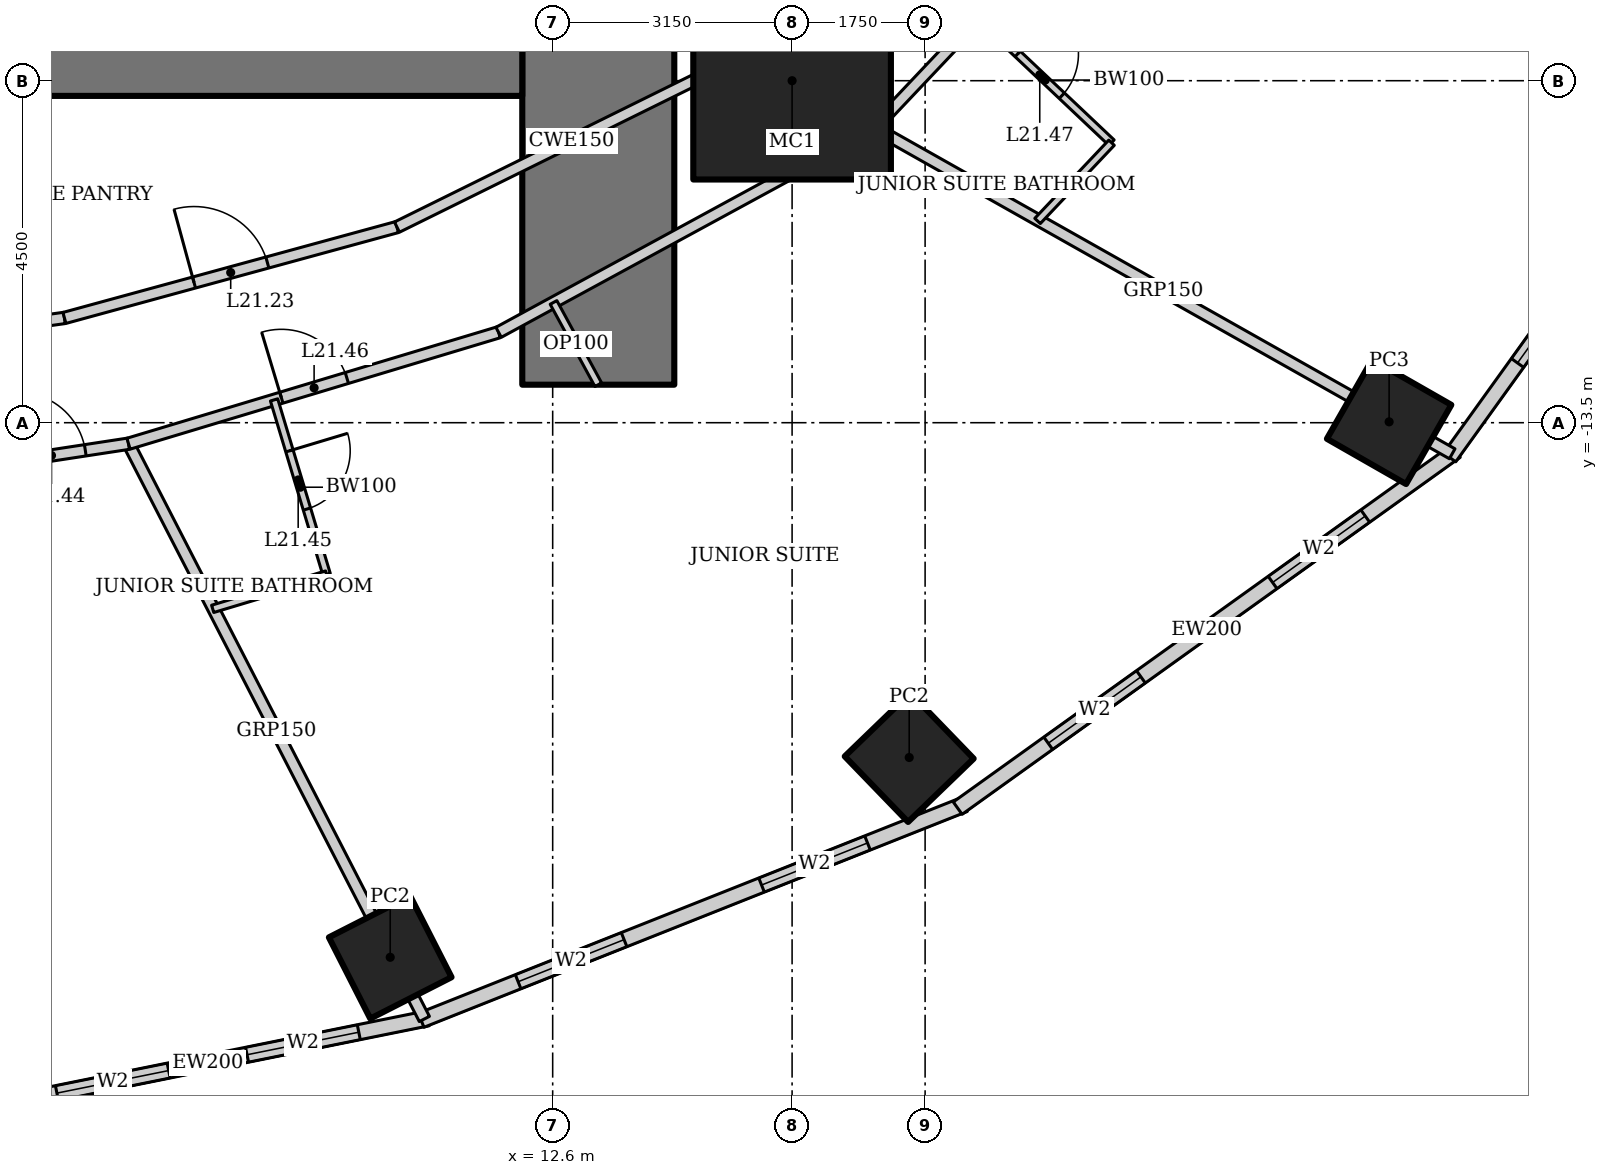
"""IFC4 building model, lengths in metres.
Left out: names, types, materials, properties, quantities, classifications, styles, units other than length and angle.
Written with IfcOpenShell. Run it as: python <this file> out.ifc"""

import sys

from ifc_helpers import new_model, si_unit, direction, frame, frame_2d, origin, origin_2d, place, context, subcontext, project, spatial, rectangle, hollow_rectangle, extrude, element, fill, save


model = new_model("IFC4")
c1 = context("Model", 3, precision=1e-05, world=origin(), true_north=direction((0.0, 1.0)))
c2 = subcontext(c1, "Body", "Model", "MODEL_VIEW")
j1 = project(units=[si_unit("LENGTHUNIT", "METRE"), si_unit("PLANEANGLEUNIT", "RADIAN")], contexts=[c1])
p1 = place(None, origin())
s1 = spatial("IfcSite", under=j1, at=p1, CompositionType="ELEMENT")
p2 = place(p1, origin())
s2 = spatial("IfcBuilding", under=s1, at=p2, CompositionType="ELEMENT")
p3 = place(p2, frame((0.0, 0.0, 91.0)))
s3 = spatial("IfcBuildingStorey", under=s2, at=p3, CompositionType="ELEMENT", Elevation=91.0)
p4 = place(p3, frame((15.75, -9.0, 0.0), z_axis=(0.0, 0.0, 1.0), x_axis=(1.0, 0.0, 0.0)))
e1 = element("IfcColumn", 1, at=p4, inside=s3, PredefinedType="COLUMN", context=c2, shape_type="SweptSolid", body=[
    extrude(hollow_rectangle(XDim=2.6, YDim=2.6, WallThickness=0.13, at=origin_2d()), origin(), (0.0, 0.0, 1.0), 3.6),
])
for number, where, z_axis, x_axis in (
    (2, (10.463, -20.534, 0.0), (0.0, 0.0, 1.0), (0.891, 0.454, 0.0)),
    (3, (17.291, -17.905, 0.0), (0.0, 0.0, 1.0), (0.719, 0.695, 0.0)),
):
    element("IfcColumn", number, at=place(p3, frame(where, z_axis=z_axis, x_axis=x_axis)), inside=s3, PredefinedType="COLUMN", context=c2, shape_type="SweptSolid", body=[
        extrude(hollow_rectangle(XDim=1.2, YDim=1.2, WallThickness=0.1, at=origin_2d()), origin(), (0.0, 0.0, 1.0), 3.6),
    ])
p5 = place(p3, frame((23.605, -13.489, 0.0), z_axis=(0.0, 0.0, 1.0), x_axis=(0.496139221777, 0.86824298017, 0.0)))
e4 = element("IfcColumn", 4, at=p5, inside=s3, PredefinedType="COLUMN", context=c2, shape_type="SweptSolid", body=[
    extrude(hollow_rectangle(XDim=1.2, YDim=1.2, WallThickness=0.12, at=origin_2d()), origin(), (0.0, 0.0, 1.0), 3.6),
])
p6 = place(p3, frame((13.2, -13.0, 0.0), z_axis=(0.0, 0.0, 1.0), x_axis=(0.0, 1.0, 0.0)))
e5 = element("IfcWall", 5, at=p6, inside=s3, PredefinedType="SHEAR", context=c2, shape_type="SweptSolid", body=[
    extrude(rectangle(XDim=26.0, YDim=2.0, at=frame_2d((13.0, 0.0))), origin(), (0.0, 0.0, 1.0), 3.6),
])
p7 = place(p6, frame((12.1, 0.0, 0.0)))
e6 = element("IfcOpeningElement", 6, at=p7, cuts=e5, PredefinedType="OPENING", context=c2, shape_type="SweptSolid", body=[
    extrude(rectangle(XDim=1.8, YDim=2.1, at=frame_2d((0.9, 1.05))), frame((0.0, 1.01, 0.0), z_axis=(0.0, -1.0, 0.0), x_axis=(1.0, 0.0, 0.0)), (0.0, 0.0, 1.0), 2.02),
])
p8 = place(p3, frame((-12.2, -8.0, 0.0), z_axis=(0.0, 0.0, 1.0), x_axis=(1.0, 0.0, 0.0)))
e7 = element("IfcWall", 7, at=p8, inside=s3, PredefinedType="SHEAR", context=c2, shape_type="SweptSolid", body=[
    extrude(rectangle(XDim=24.4, YDim=2.4, at=frame_2d((12.2, 0.0))), origin(), (0.0, 0.0, 1.0), 3.6),
])
p9 = place(p3, frame((5.17, -22.504, 0.0), z_axis=(0.0, 0.0, 1.0), x_axis=(0.980251657452, 0.197754110105, 0.0)))
e8 = element("IfcWall", 8, at=p9, inside=s3, PredefinedType="SOLIDWALL", context=c2, shape_type="SweptSolid", body=[
    extrude(rectangle(XDim=5.904, YDim=0.2, at=frame_2d((2.952, 0.0))), origin(), (0.0, 0.0, 1.0), 3.45),
])
p10 = place(p9, frame((0.926, 0.0, 0.5)))
e9 = element("IfcOpeningElement", 9, at=p10, cuts=e8, PredefinedType="OPENING", context=c2, shape_type="SweptSolid", body=[
    extrude(rectangle(XDim=1.5, YDim=2.2, at=frame_2d((0.75, 1.1))), frame((0.0, 0.11, 0.0), z_axis=(0.0, -1.0, 0.0), x_axis=(1.0, 0.0, 0.0)), (0.0, 0.0, 1.0), 0.22),
])
p11 = place(p9, frame((3.478, 0.0, 0.5)))
e10 = element("IfcOpeningElement", 10, at=p11, cuts=e8, PredefinedType="OPENING", context=c2, shape_type="SweptSolid", body=[
    extrude(rectangle(XDim=1.5, YDim=2.2, at=frame_2d((0.75, 1.1))), frame((0.0, 0.11, 0.0), z_axis=(0.0, -1.0, 0.0), x_axis=(1.0, 0.0, 0.0)), (0.0, 0.0, 1.0), 0.22),
])
p12 = place(p3, frame((10.869, -21.363, 0.0), z_axis=(0.0, 0.0, 1.0), x_axis=(0.929358351251, 0.369178892895, 0.0)))
e11 = element("IfcWall", 11, at=p12, inside=s3, PredefinedType="SOLIDWALL", context=c2, shape_type="SweptSolid", body=[
    extrude(rectangle(XDim=7.692, YDim=0.2, at=frame_2d((3.846, 0.0))), origin(), (0.0, 0.0, 1.0), 3.45),
])
p13 = place(p12, frame((1.373, 0.0, 0.5)))
e12 = element("IfcOpeningElement", 12, at=p13, cuts=e11, PredefinedType="OPENING", context=c2, shape_type="SweptSolid", body=[
    extrude(rectangle(XDim=1.5, YDim=2.2, at=frame_2d((0.75, 1.1))), frame((0.0, 0.11, 0.0), z_axis=(0.0, -1.0, 0.0), x_axis=(1.0, 0.0, 0.0)), (0.0, 0.0, 1.0), 0.22),
])
p14 = place(p12, frame((4.819, 0.0, 0.5)))
e13 = element("IfcOpeningElement", 13, at=p14, cuts=e11, PredefinedType="OPENING", context=c2, shape_type="SweptSolid", body=[
    extrude(rectangle(XDim=1.5, YDim=2.2, at=frame_2d((0.75, 1.1))), frame((0.0, 0.11, 0.0), z_axis=(0.0, -1.0, 0.0), x_axis=(1.0, 0.0, 0.0)), (0.0, 0.0, 1.0), 0.22),
])
p15 = place(p3, frame((17.929, -18.572, 0.0), z_axis=(0.0, 0.0, 1.0), x_axis=(0.812791321576, 0.582554948112, 0.0)))
e14 = element("IfcWall", 14, at=p15, inside=s3, PredefinedType="SOLIDWALL", context=c2, shape_type="SweptSolid", body=[
    extrude(rectangle(XDim=8.063, YDim=0.2, at=frame_2d((4.032, 0.0))), origin(), (0.0, 0.0, 1.0), 3.45),
])
p16 = place(p15, frame((1.466, 0.0, 0.5)))
e15 = element("IfcOpeningElement", 15, at=p16, cuts=e14, PredefinedType="OPENING", context=c2, shape_type="SweptSolid", body=[
    extrude(rectangle(XDim=1.5, YDim=2.2, at=frame_2d((0.75, 1.1))), frame((0.0, 0.11, 0.0), z_axis=(0.0, -1.0, 0.0), x_axis=(1.0, 0.0, 0.0)), (0.0, 0.0, 1.0), 0.22),
])
p17 = place(p15, frame((5.097, 0.0, 0.5)))
e16 = element("IfcOpeningElement", 16, at=p17, cuts=e14, PredefinedType="OPENING", context=c2, shape_type="SweptSolid", body=[
    extrude(rectangle(XDim=1.5, YDim=2.2, at=frame_2d((0.75, 1.1))), frame((0.0, 0.11, 0.0), z_axis=(0.0, -1.0, 0.0), x_axis=(1.0, 0.0, 0.0)), (0.0, 0.0, 1.0), 0.22),
])
p18 = place(p3, frame((24.4, -13.957, 0.0), z_axis=(0.0, 0.0, 1.0), x_axis=(0.583937613703, 0.811798536155, 0.0)))
e17 = element("IfcWall", 17, at=p18, inside=s3, PredefinedType="SOLIDWALL", context=c2, shape_type="SweptSolid", body=[
    extrude(rectangle(XDim=8.323, YDim=0.2, at=frame_2d((4.162, 0.0))), origin(), (0.0, 0.0, 1.0), 3.45),
])
p19 = place(p18, frame((1.531, 0.0, 0.5)))
e18 = element("IfcOpeningElement", 18, at=p19, cuts=e17, PredefinedType="OPENING", context=c2, shape_type="SweptSolid", body=[
    extrude(rectangle(XDim=1.5, YDim=2.2, at=frame_2d((0.75, 1.1))), frame((0.0, 0.11, 0.0), z_axis=(0.0, -1.0, 0.0), x_axis=(1.0, 0.0, 0.0)), (0.0, 0.0, 1.0), 0.22),
])
p20 = place(p18, frame((5.292, 0.0, 0.5)))
e19 = element("IfcOpeningElement", 19, at=p20, cuts=e17, PredefinedType="OPENING", context=c2, shape_type="SweptSolid", body=[
    extrude(rectangle(XDim=1.5, YDim=2.2, at=frame_2d((0.75, 1.1))), frame((0.0, 0.11, 0.0), z_axis=(0.0, -1.0, 0.0), x_axis=(1.0, 0.0, 0.0)), (0.0, 0.0, 1.0), 0.22),
])
p21 = place(p3, frame((10.912, -21.346, 0.0), z_axis=(0.0, 0.0, 1.0), x_axis=(-0.457327273085, 0.889298468059, 0.0)))
e20 = element("IfcWall", 20, at=p21, inside=s3, PredefinedType="PARTITIONING", context=c2, shape_type="SweptSolid", body=[
    extrude(rectangle(XDim=8.511, YDim=0.15, at=frame_2d((4.256, 0.0))), origin(), (0.0, 0.0, 1.0), 2.528),
])
p22 = place(p3, frame((24.435, -13.909, 0.0), z_axis=(0.0, 0.0, 1.0), x_axis=(-0.87090601027, 0.491449612143, 0.0)))
e21 = element("IfcWall", 21, at=p22, inside=s3, PredefinedType="PARTITIONING", context=c2, shape_type="SweptSolid", body=[
    extrude(rectangle(XDim=8.726, YDim=0.15, at=frame_2d((4.363, 0.0))), origin(), (0.0, 0.0, 1.0), 2.693),
])
p23 = place(p3, frame((3.311, -14.342, 0.0), z_axis=(0.0, 0.0, 1.0), x_axis=(0.988564270062, 0.150800145746, 0.0)))
e22 = element("IfcWall", 22, at=p23, inside=s3, PredefinedType="PARTITIONING", context=c2, shape_type="SweptSolid", body=[
    extrude(rectangle(XDim=3.751, YDim=0.15, at=frame_2d((1.875, 0.0))), origin(), (0.0, 0.0, 1.0), 3.45),
])
p24 = place(p23, frame((2.276, 0.0, 0.0)))
e23 = element("IfcOpeningElement", 23, at=p24, cuts=e22, PredefinedType="OPENING", context=c2, shape_type="SweptSolid", body=[
    extrude(rectangle(XDim=0.9, YDim=2.1, at=frame_2d((0.45, 1.05))), frame((0.0, 0.085, 0.0), z_axis=(0.0, -1.0, 0.0), x_axis=(1.0, 0.0, 0.0)), (0.0, 0.0, 1.0), 0.17),
])
p25 = place(p3, frame((7.019, -13.776, 0.0), z_axis=(0.0, 0.0, 1.0), x_axis=(0.957564241242, 0.288219922793, 0.0)))
e24 = element("IfcWall", 24, at=p25, inside=s3, PredefinedType="PARTITIONING", context=c2, shape_type="SweptSolid", body=[
    extrude(rectangle(XDim=5.085, YDim=0.15, at=frame_2d((2.542, 0.0))), origin(), (0.0, 0.0, 1.0), 3.45),
])
p26 = place(p25, frame((2.1, 0.0, 0.0)))
e25 = element("IfcOpeningElement", 25, at=p26, cuts=e24, PredefinedType="OPENING", context=c2, shape_type="SweptSolid", body=[
    extrude(rectangle(XDim=0.9, YDim=2.1, at=frame_2d((0.45, 1.05))), frame((0.0, 0.085, 0.0), z_axis=(0.0, -1.0, 0.0), x_axis=(1.0, 0.0, 0.0)), (0.0, 0.0, 1.0), 0.17),
])
p27 = place(p3, frame((11.888, -12.311, 0.0), z_axis=(0.0, 0.0, 1.0), x_axis=(0.878450059298, 0.477834169267, 0.0)))
e26 = element("IfcWall", 26, at=p27, inside=s3, PredefinedType="PARTITIONING", context=c2, shape_type="SweptSolid", body=[
    extrude(rectangle(XDim=5.631, YDim=0.15, at=frame_2d((2.815, 0.0))), origin(), (0.0, 0.0, 1.0), 3.45),
])
p28 = place(p3, frame((16.835, -9.62, 0.0), z_axis=(0.0, 0.0, 1.0), x_axis=(0.687062608696, 0.726598218916, 0.0)))
e27 = element("IfcWall", 27, at=p28, inside=s3, PredefinedType="PARTITIONING", context=c2, shape_type="SweptSolid", body=[
    extrude(rectangle(XDim=6.039, YDim=0.15, at=frame_2d((3.02, 0.0))), origin(), (0.0, 0.0, 1.0), 3.45),
])
p29 = place(p3, frame((2.903, -12.574, 0.0), z_axis=(0.0, 0.0, 1.0), x_axis=(0.990563451353, 0.137054911782, 0.0)))
e28 = element("IfcWall", 28, at=p29, inside=s3, PredefinedType="PARTITIONING", context=c2, shape_type="SweptSolid", body=[
    extrude(rectangle(XDim=3.304, YDim=0.15, at=frame_2d((1.652, 0.0))), origin(), (0.0, 0.0, 1.0), 3.45),
])
p30 = place(p3, frame((6.176, -12.122, 0.0), z_axis=(0.0, 0.0, 1.0), x_axis=(0.964644466646, 0.263554648923, 0.0)))
e29 = element("IfcWall", 29, at=p30, inside=s3, PredefinedType="PARTITIONING", context=c2, shape_type="SweptSolid", body=[
    extrude(rectangle(XDim=4.535, YDim=0.15, at=frame_2d((2.268, 0.0))), origin(), (0.0, 0.0, 1.0), 3.45),
])
p31 = place(p30, frame((1.768, 0.0, 0.0)))
e30 = element("IfcOpeningElement", 30, at=p31, cuts=e29, PredefinedType="OPENING", context=c2, shape_type="SweptSolid", body=[
    extrude(rectangle(XDim=1.0, YDim=2.1, at=frame_2d((0.5, 1.05))), frame((0.0, 0.085, 0.0), z_axis=(0.0, -1.0, 0.0), x_axis=(1.0, 0.0, 0.0)), (0.0, 0.0, 1.0), 0.17),
])
p32 = place(p3, frame((10.551, -10.926, 0.0), z_axis=(0.0, 0.0, 1.0), x_axis=(0.89656943448, 0.442903205177, 0.0)))
e31 = element("IfcWall", 31, at=p32, inside=s3, PredefinedType="PARTITIONING", context=c2, shape_type="SweptSolid", body=[
    extrude(rectangle(XDim=5.126, YDim=0.15, at=frame_2d((2.563, 0.0))), origin(), (0.0, 0.0, 1.0), 3.45),
])
p33 = place(p3, frame((15.147, -8.656, 0.0), z_axis=(0.0, 0.0, 1.0), x_axis=(0.720837261072, 0.693104352209, 0.0)))
e32 = element("IfcWall", 32, at=p33, inside=s3, PredefinedType="PARTITIONING", context=c2, shape_type="SweptSolid", body=[
    extrude(rectangle(XDim=5.59, YDim=0.15, at=frame_2d((2.795, 0.0))), origin(), (0.0, 0.0, 1.0), 3.45),
])
p34 = place(p33, frame((2.295, 0.0, 0.0)))
e33 = element("IfcOpeningElement", 33, at=p34, cuts=e32, PredefinedType="OPENING", context=c2, shape_type="SweptSolid", body=[
    extrude(rectangle(XDim=1.0, YDim=2.1, at=frame_2d((0.5, 1.05))), frame((0.0, 0.085, 0.0), z_axis=(0.0, -1.0, 0.0), x_axis=(1.0, 0.0, 0.0)), (0.0, 0.0, 1.0), 0.17),
])
p35 = place(p3, frame((8.935, -13.2, 0.0), z_axis=(0.0, 0.0, 1.0), x_axis=(0.288197066254, -0.957571120598, 0.0)))
e34 = element("IfcWall", 34, at=p35, inside=s3, PredefinedType="PARTITIONING", context=c2, shape_type="SweptSolid", body=[
    extrude(rectangle(XDim=2.4, YDim=0.1, at=frame_2d((1.2, 0.0))), origin(), (0.0, 0.0, 1.0), 3.45),
])
p36 = place(p35, frame((0.7, 0.0, 0.0)))
e35 = element("IfcOpeningElement", 35, at=p36, cuts=e34, PredefinedType="OPENING", context=c2, shape_type="SweptSolid", body=[
    extrude(rectangle(XDim=0.8, YDim=2.1, at=frame_2d((0.4, 1.05))), frame((0.0, 0.06, 0.0), z_axis=(0.0, -1.0, 0.0), x_axis=(1.0, 0.0, 0.0)), (0.0, 0.0, 1.0), 0.12),
])
p37 = place(p3, frame((9.626, -15.498, 0.0), z_axis=(0.0, 0.0, 1.0), x_axis=(-0.957551231109, -0.288263143328, 0.0)))
e36 = element("IfcWall", 36, at=p37, inside=s3, PredefinedType="PARTITIONING", context=c2, shape_type="SweptSolid", body=[
    extrude(rectangle(XDim=1.566, YDim=0.1, at=frame_2d((0.783, 0.0))), origin(), (0.0, 0.0, 1.0), 3.45),
])
p38 = place(p3, frame((18.209, -8.167, 0.0), z_axis=(0.0, 0.0, 1.0), x_axis=(0.726567238928, -0.687095369885, 0.0)))
e37 = element("IfcWall", 37, at=p38, inside=s3, PredefinedType="PARTITIONING", context=c2, shape_type="SweptSolid", body=[
    extrude(rectangle(XDim=2.4, YDim=0.1, at=frame_2d((1.2, 0.0))), origin(), (0.0, 0.0, 1.0), 3.45),
])
p39 = place(p38, frame((0.7, 0.0, 0.0)))
e38 = element("IfcOpeningElement", 38, at=p39, cuts=e37, PredefinedType="OPENING", context=c2, shape_type="SweptSolid", body=[
    extrude(rectangle(XDim=0.8, YDim=2.1, at=frame_2d((0.4, 1.05))), frame((0.0, 0.06, 0.0), z_axis=(0.0, -1.0, 0.0), x_axis=(1.0, 0.0, 0.0)), (0.0, 0.0, 1.0), 0.12),
])
p40 = place(p3, frame((19.953, -9.816, 0.0), z_axis=(0.0, 0.0, 1.0), x_axis=(-0.687017997787, -0.726640399866, 0.0)))
e39 = element("IfcWall", 39, at=p40, inside=s3, PredefinedType="PARTITIONING", context=c2, shape_type="SweptSolid", body=[
    extrude(rectangle(XDim=1.417, YDim=0.1, at=frame_2d((0.708, 0.0))), origin(), (0.0, 0.0, 1.0), 3.45),
])
p41 = place(p3, frame((13.2, -13.0, 0.0), z_axis=(0.0, 0.0, 1.0), x_axis=(-0.477852414256, 0.878440134665, 0.0)))
e40 = element("IfcWall", 40, at=p41, inside=s3, PredefinedType="PARTITIONING", context=c2, shape_type="SweptSolid", body=[
    extrude(rectangle(XDim=1.232, YDim=0.1, at=frame_2d((0.616, 0.0))), origin(), (0.0, 0.0, 1.0), 3.45),
])
p42 = place(p10, origin())
e41 = element("IfcWindow", 41, at=p42, inside=s3, PartitioningType="SINGLE_PANEL", PredefinedType="WINDOW", context=c2, shape_type="SweptSolid", body=[
    extrude(rectangle(XDim=1.5, YDim=2.2, at=frame_2d((0.75, 1.1))), frame((0.0, 0.03, 0.0), z_axis=(0.0, -1.0, 0.0), x_axis=(1.0, 0.0, 0.0)), (0.0, 0.0, 1.0), 0.06),
])
fill(e9, e41)
p43 = place(p11, origin())
e42 = element("IfcWindow", 42, at=p43, inside=s3, PartitioningType="SINGLE_PANEL", PredefinedType="WINDOW", context=c2, shape_type="SweptSolid", body=[
    extrude(rectangle(XDim=1.5, YDim=2.2, at=frame_2d((0.75, 1.1))), frame((0.0, 0.03, 0.0), z_axis=(0.0, -1.0, 0.0), x_axis=(1.0, 0.0, 0.0)), (0.0, 0.0, 1.0), 0.06),
])
fill(e10, e42)
p44 = place(p13, origin())
e43 = element("IfcWindow", 43, at=p44, inside=s3, PartitioningType="SINGLE_PANEL", PredefinedType="WINDOW", context=c2, shape_type="SweptSolid", body=[
    extrude(rectangle(XDim=1.5, YDim=2.2, at=frame_2d((0.75, 1.1))), frame((0.0, 0.03, 0.0), z_axis=(0.0, -1.0, 0.0), x_axis=(1.0, 0.0, 0.0)), (0.0, 0.0, 1.0), 0.06),
])
fill(e12, e43)
p45 = place(p14, origin())
e44 = element("IfcWindow", 44, at=p45, inside=s3, PartitioningType="SINGLE_PANEL", PredefinedType="WINDOW", context=c2, shape_type="SweptSolid", body=[
    extrude(rectangle(XDim=1.5, YDim=2.2, at=frame_2d((0.75, 1.1))), frame((0.0, 0.03, 0.0), z_axis=(0.0, -1.0, 0.0), x_axis=(1.0, 0.0, 0.0)), (0.0, 0.0, 1.0), 0.06),
])
fill(e13, e44)
p46 = place(p16, origin())
e45 = element("IfcWindow", 45, at=p46, inside=s3, PartitioningType="SINGLE_PANEL", PredefinedType="WINDOW", context=c2, shape_type="SweptSolid", body=[
    extrude(rectangle(XDim=1.5, YDim=2.2, at=frame_2d((0.75, 1.1))), frame((0.0, 0.03, 0.0), z_axis=(0.0, -1.0, 0.0), x_axis=(1.0, 0.0, 0.0)), (0.0, 0.0, 1.0), 0.06),
])
fill(e15, e45)
p47 = place(p17, origin())
e46 = element("IfcWindow", 46, at=p47, inside=s3, PartitioningType="SINGLE_PANEL", PredefinedType="WINDOW", context=c2, shape_type="SweptSolid", body=[
    extrude(rectangle(XDim=1.5, YDim=2.2, at=frame_2d((0.75, 1.1))), frame((0.0, 0.03, 0.0), z_axis=(0.0, -1.0, 0.0), x_axis=(1.0, 0.0, 0.0)), (0.0, 0.0, 1.0), 0.06),
])
fill(e16, e46)
p48 = place(p19, origin())
e47 = element("IfcWindow", 47, at=p48, inside=s3, PartitioningType="SINGLE_PANEL", PredefinedType="WINDOW", context=c2, shape_type="SweptSolid", body=[
    extrude(rectangle(XDim=1.5, YDim=2.2, at=frame_2d((0.75, 1.1))), frame((0.0, 0.03, 0.0), z_axis=(0.0, -1.0, 0.0), x_axis=(1.0, 0.0, 0.0)), (0.0, 0.0, 1.0), 0.06),
])
fill(e18, e47)
p49 = place(p31, origin())
e48 = element("IfcDoor", 48, at=p49, inside=s3, OperationType="SINGLE_SWING_LEFT", PredefinedType="DOOR", context=c2, shape_type="SweptSolid", body=[
    extrude(rectangle(XDim=1.0, YDim=2.1, at=frame_2d((0.5, 1.05))), frame((0.0, 0.025, 0.0), z_axis=(0.0, -1.0, 0.0), x_axis=(1.0, 0.0, 0.0)), (0.0, 0.0, 1.0), 0.05),
])
fill(e30, e48)
p50 = place(p24, origin())
e49 = element("IfcDoor", 49, at=p50, inside=s3, OperationType="SINGLE_SWING_LEFT", PredefinedType="DOOR", context=c2, shape_type="SweptSolid", body=[
    extrude(rectangle(XDim=0.9, YDim=2.1, at=frame_2d((0.45, 1.05))), frame((0.0, 0.025, 0.0), z_axis=(0.0, -1.0, 0.0), x_axis=(1.0, 0.0, 0.0)), (0.0, 0.0, 1.0), 0.05),
])
fill(e23, e49)
p51 = place(p36, origin())
e50 = element("IfcDoor", 50, at=p51, inside=s3, OperationType="SINGLE_SWING_LEFT", PredefinedType="DOOR", context=c2, shape_type="SweptSolid", body=[
    extrude(rectangle(XDim=0.8, YDim=2.1, at=frame_2d((0.4, 1.05))), frame((0.0, 0.025, 0.0), z_axis=(0.0, -1.0, 0.0), x_axis=(1.0, 0.0, 0.0)), (0.0, 0.0, 1.0), 0.05),
])
fill(e35, e50)
p52 = place(p26, origin())
e51 = element("IfcDoor", 51, at=p52, inside=s3, OperationType="SINGLE_SWING_LEFT", PredefinedType="DOOR", context=c2, shape_type="SweptSolid", body=[
    extrude(rectangle(XDim=0.9, YDim=2.1, at=frame_2d((0.45, 1.05))), frame((0.0, 0.025, 0.0), z_axis=(0.0, -1.0, 0.0), x_axis=(1.0, 0.0, 0.0)), (0.0, 0.0, 1.0), 0.05),
])
fill(e25, e51)
p53 = place(p39, origin())
e52 = element("IfcDoor", 52, at=p53, inside=s3, OperationType="SINGLE_SWING_LEFT", PredefinedType="DOOR", context=c2, shape_type="SweptSolid", body=[
    extrude(rectangle(XDim=0.8, YDim=2.1, at=frame_2d((0.4, 1.05))), frame((0.0, 0.025, 0.0), z_axis=(0.0, -1.0, 0.0), x_axis=(1.0, 0.0, 0.0)), (0.0, 0.0, 1.0), 0.05),
])
fill(e38, e52)
save(model, sys.argv[1])
